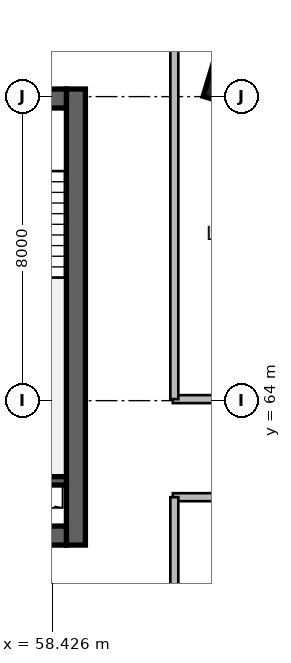
"""IFC4 building model, lengths in metres.
Left out: names, types, materials, properties, quantities, classifications, styles, units other than length and angle.
Written with IfcOpenShell. Run it as: python <this file> out.ifc"""

import sys

from ifc_helpers import new_model, si_unit, direction, frame, frame_2d, origin, origin_2d, place, context, subcontext, project, spatial, rectangle, extrude, source, transform, mapped, element, save


model = new_model("IFC4")
c1 = context("Model", 3, precision=1e-05, world=origin(), true_north=direction((0.0, 1.0)))
c2 = subcontext(c1, "Body", "Model", "MODEL_VIEW")
j1 = project(units=[si_unit("LENGTHUNIT", "METRE"), si_unit("PLANEANGLEUNIT", "RADIAN")], contexts=[c1])
p1 = place(None, origin())
s1 = spatial("IfcSite", under=j1, at=p1, CompositionType="ELEMENT")
p2 = place(p1, origin())
s2 = spatial("IfcBuilding", under=s1, at=p2, CompositionType="ELEMENT")
p3 = place(p2, frame((0.0, 0.0, 138.9)))
s3 = spatial("IfcBuildingStorey", under=s2, at=p3, CompositionType="ELEMENT", Elevation=138.9)
m1 = source(origin(), c2, "Body", "SweptSolid", [
    extrude(rectangle(XDim=12.0, YDim=0.5, at=frame_2d((6.0, 0.0))), origin(), (0.0, 0.0, 1.0), 3.9),
])
p4 = place(p3, frame((59.05, 60.2, 0.0), z_axis=(0.0, 0.0, 1.0), x_axis=(0.0, 1.0, 0.0)))
e1 = element("IfcWall", 1, at=p4, inside=s3, PredefinedType="SHEAR", context=c2, shape_type="MappedRepresentation", body=[
    mapped(m1, transform((0.0, 0.0, 0.0), scale=1.0)),
])
m2 = source(origin(), c2, "Body", "SweptSolid", [
    extrude(rectangle(XDim=21.6, YDim=0.5, at=frame_2d((10.8, 0.0))), origin(), (0.0, 0.0, 1.0), 3.9),
])
p5 = place(p3, frame((37.2, 60.45, 0.0), z_axis=(0.0, 0.0, 1.0), x_axis=(1.0, 0.0, 0.0)))
e2 = element("IfcWall", 2, at=p5, inside=s3, PredefinedType="SHEAR", context=c2, shape_type="MappedRepresentation", body=[
    mapped(m2, transform((0.0, 0.0, 0.0), scale=1.0)),
])
p6 = place(p5, frame((1.1, 0.0, 0.0)))
e3 = element("IfcOpeningElement", 3, at=p6, cuts=e2, PredefinedType="OPENING", context=c2, shape_type="SweptSolid", body=[
    extrude(rectangle(XDim=1.15, YDim=2.15, at=frame_2d((0.575, 1.075))), frame((0.0, 0.26, 0.0), z_axis=(0.0, -1.0, 0.0), x_axis=(1.0, 0.0, 0.0)), (0.0, 0.0, 1.0), 0.52),
])
p7 = place(p5, frame((19.5, 0.0, 0.0)))
e4 = element("IfcOpeningElement", 4, at=p7, cuts=e2, PredefinedType="OPENING", context=c2, shape_type="SweptSolid", body=[
    extrude(rectangle(XDim=0.9, YDim=2.1, at=frame_2d((0.45, 1.05))), frame((0.0, 0.26, 0.0), z_axis=(0.0, -1.0, 0.0), x_axis=(1.0, 0.0, 0.0)), (0.0, 0.0, 1.0), 0.52),
])
p8 = place(p5, frame((12.02, 0.0, 0.0)))
e5 = element("IfcOpeningElement", 5, at=p8, cuts=e2, PredefinedType="OPENING", context=c2, shape_type="SweptSolid", body=[
    extrude(rectangle(XDim=1.6, YDim=2.15, at=frame_2d((0.8, 1.075))), frame((0.0, 0.26, 0.0), z_axis=(0.0, -1.0, 0.0), x_axis=(1.0, 0.0, 0.0)), (0.0, 0.0, 1.0), 0.52),
])
p9 = place(p3, frame((37.2, 71.95, 0.0), z_axis=(0.0, 0.0, 1.0), x_axis=(1.0, 0.0, 0.0)))
e6 = element("IfcWall", 6, at=p9, inside=s3, PredefinedType="SHEAR", context=c2, shape_type="MappedRepresentation", body=[
    mapped(m2, transform((0.0, 0.0, 0.0), scale=1.0)),
])
p10 = place(p9, frame((1.2, 0.0, 0.0)))
e7 = element("IfcOpeningElement", 7, at=p10, cuts=e6, PredefinedType="OPENING", context=c2, shape_type="SweptSolid", body=[
    extrude(rectangle(XDim=0.9, YDim=2.1, at=frame_2d((0.45, 1.05))), frame((0.0, 0.26, 0.0), z_axis=(0.0, -1.0, 0.0), x_axis=(1.0, 0.0, 0.0)), (0.0, 0.0, 1.0), 0.52),
])
p11 = place(p9, frame((14.7, 0.0, 0.0)))
e8 = element("IfcOpeningElement", 8, at=p11, cuts=e6, PredefinedType="OPENING", context=c2, shape_type="SweptSolid", body=[
    extrude(rectangle(XDim=1.2, YDim=2.15, at=frame_2d((0.6, 1.075))), frame((0.0, 0.26, 0.0), z_axis=(0.0, -1.0, 0.0), x_axis=(1.0, 0.0, 0.0)), (0.0, 0.0, 1.0), 0.52),
])
p12 = place(p9, frame((4.15, 0.0, 0.0)))
e9 = element("IfcOpeningElement", 9, at=p12, cuts=e6, PredefinedType="OPENING", context=c2, shape_type="SweptSolid", body=[
    extrude(rectangle(XDim=1.3, YDim=2.15, at=frame_2d((0.65, 1.075))), frame((0.0, 0.26, 0.0), z_axis=(0.0, -1.0, 0.0), x_axis=(1.0, 0.0, 0.0)), (0.0, 0.0, 1.0), 0.52),
])
p13 = place(p9, frame((7.25, 0.0, 0.0)))
e10 = element("IfcOpeningElement", 10, at=p13, cuts=e6, PredefinedType="OPENING", context=c2, shape_type="SweptSolid", body=[
    extrude(rectangle(XDim=0.9, YDim=2.1, at=frame_2d((0.45, 1.05))), frame((0.0, 0.26, 0.0), z_axis=(0.0, -1.0, 0.0), x_axis=(1.0, 0.0, 0.0)), (0.0, 0.0, 1.0), 0.52),
])
p14 = place(p9, frame((10.95, 0.0, 0.0)))
e11 = element("IfcOpeningElement", 11, at=p14, cuts=e6, PredefinedType="OPENING", context=c2, shape_type="SweptSolid", body=[
    extrude(rectangle(XDim=0.9, YDim=2.1, at=frame_2d((0.45, 1.05))), frame((0.0, 0.26, 0.0), z_axis=(0.0, -1.0, 0.0), x_axis=(1.0, 0.0, 0.0)), (0.0, 0.0, 1.0), 0.52),
])
m3 = source(origin(), c2, "Body", "SweptSolid", [
    extrude(rectangle(XDim=3.27, YDim=0.22, at=frame_2d((1.635, 0.0))), origin(), (0.0, 0.0, 1.0), 3.9),
])
p15 = place(p3, frame((55.53, 61.89, 0.0), z_axis=(0.0, 0.0, 1.0), x_axis=(1.0, 0.0, 0.0)))
e12 = element("IfcWall", 12, at=p15, inside=s3, PredefinedType="SHEAR", context=c2, shape_type="MappedRepresentation", body=[
    mapped(m3, transform((0.0, 0.0, 0.0), scale=1.0)),
])
m4 = source(origin(), c2, "Body", "SweptSolid", [
    extrude(rectangle(XDim=1.3, YDim=1.3, at=origin_2d()), origin(), (0.0, 0.0, 1.0), 3.9),
])
p16 = place(p3, frame((63.209, 72.442, 0.0), z_axis=(0.0, 0.0, 1.0), x_axis=(0.288697611798, 0.957420330337, 0.0)))
e13 = element("IfcColumn", 13, at=p16, inside=s3, PredefinedType="COLUMN", context=c2, shape_type="MappedRepresentation", body=[
    mapped(m4, transform((0.0, 0.0, 0.0), scale=1.0)),
])
m5 = source(origin(), c2, "Body", "SweptSolid", [
    extrude(rectangle(XDim=4.2, YDim=0.21, at=frame_2d((2.1, 0.0))), origin(), (0.0, 0.0, 1.0), 3.65),
])
p17 = place(p3, frame((61.6, 64.04, 0.0), z_axis=(0.0, 0.0, 1.0), x_axis=(1.0, 0.0, 0.0)))
e14 = element("IfcWall", 14, at=p17, inside=s3, PredefinedType="PARTITIONING", context=c2, shape_type="MappedRepresentation", body=[
    mapped(m5, transform((0.0, 0.0, 0.0), scale=1.0)),
])
p18 = place(p17, frame((1.625, 0.0, 0.0)))
e15 = element("IfcOpeningElement", 15, at=p18, cuts=e14, PredefinedType="OPENING", context=c2, shape_type="SweptSolid", body=[
    extrude(rectangle(XDim=0.95, YDim=2.1, at=frame_2d((0.475, 1.05))), frame((0.0, 0.115, 0.0), z_axis=(0.0, -1.0, 0.0), x_axis=(1.0, 0.0, 0.0)), (0.0, 0.0, 1.0), 0.23),
])
p19 = place(p3, frame((61.6, 61.46, 0.0), z_axis=(0.0, 0.0, 1.0), x_axis=(1.0, 0.0, 0.0)))
e16 = element("IfcWall", 16, at=p19, inside=s3, PredefinedType="PARTITIONING", context=c2, shape_type="MappedRepresentation", body=[
    mapped(m5, transform((0.0, 0.0, 0.0), scale=1.0)),
])
p20 = place(p19, frame((1.625, 0.0, 0.0)))
e17 = element("IfcOpeningElement", 17, at=p20, cuts=e16, PredefinedType="OPENING", context=c2, shape_type="SweptSolid", body=[
    extrude(rectangle(XDim=0.95, YDim=2.1, at=frame_2d((0.475, 1.05))), frame((0.0, 0.115, 0.0), z_axis=(0.0, -1.0, 0.0), x_axis=(1.0, 0.0, 0.0)), (0.0, 0.0, 1.0), 0.23),
])
m6 = source(origin(), c2, "Body", "SweptSolid", [
    extrude(rectangle(XDim=13.988, YDim=0.21, at=frame_2d((6.994, 0.0))), origin(), (0.0, 0.0, 1.0), 2.942),
])
p21 = place(p3, frame((61.64, 47.472, 0.0), z_axis=(0.0, 0.0, 1.0), x_axis=(0.0, 1.0, 0.0)))
e18 = element("IfcWall", 18, at=p21, inside=s3, PredefinedType="PARTITIONING", context=c2, shape_type="MappedRepresentation", body=[
    mapped(m6, transform((0.0, 0.0, 0.0), scale=1.0)),
])
m7 = source(origin(), c2, "Body", "SweptSolid", [
    extrude(rectangle(XDim=11.987, YDim=0.21, at=frame_2d((5.994, 0.0))), origin(), (0.0, 0.0, 1.0), 3.65),
])
p22 = place(p3, frame((61.64, 64.04, 0.0), z_axis=(0.0, 0.0, 1.0), x_axis=(0.0, 1.0, 0.0)))
e19 = element("IfcWall", 19, at=p22, inside=s3, PredefinedType="PARTITIONING", context=c2, shape_type="MappedRepresentation", body=[
    mapped(m7, transform((0.0, 0.0, 0.0), scale=1.0)),
])
save(model, sys.argv[1])
